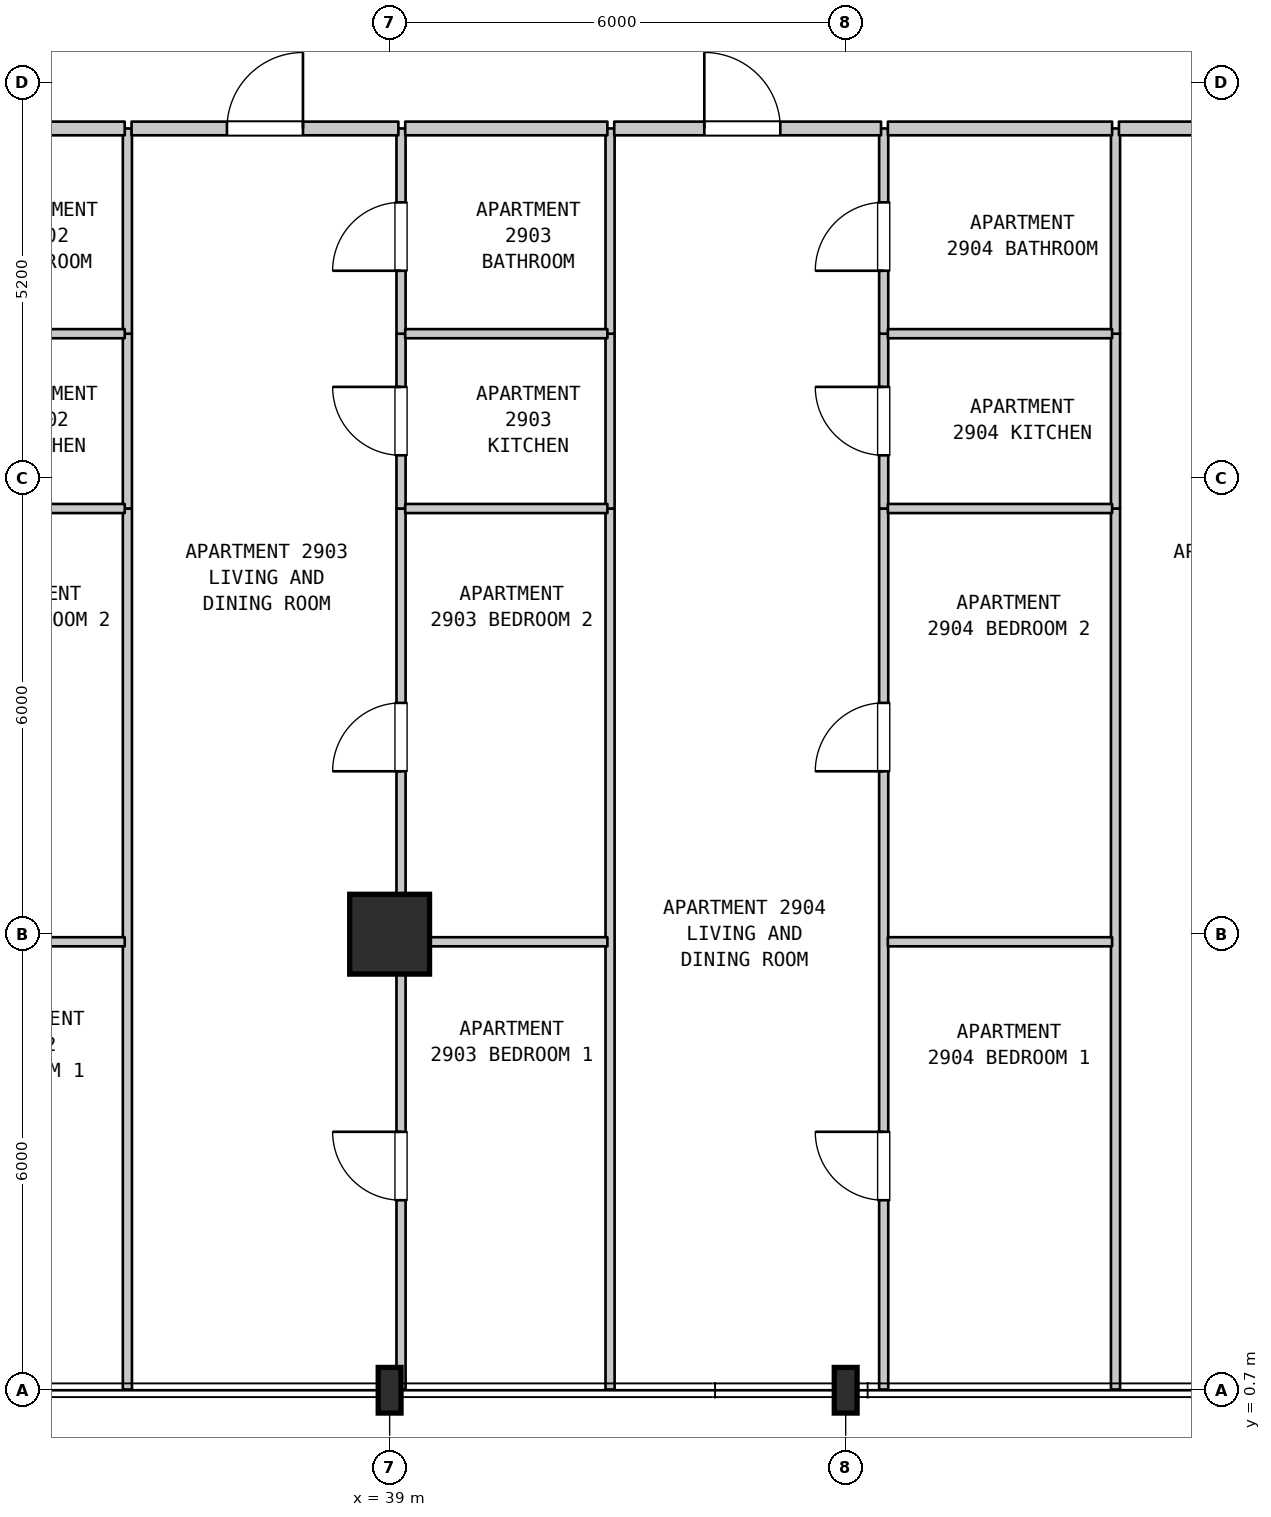
"""IFC4 building model, lengths in metres.
Left out: names, types, materials, properties, quantities, classifications, styles, units other than length and angle.
Written with IfcOpenShell. Run it as: python <this file> out.ifc"""

import sys

from ifc_helpers import new_model, si_unit, direction, frame, frame_2d, origin, origin_2d, place, context, subcontext, project, spatial, rectangle, i_section, extrude, element, fill, save


model = new_model("IFC4")
c1 = context("Model", 3, precision=1e-05, world=origin(), true_north=direction((0.0, 1.0)))
c2 = subcontext(c1, "Body", "Model", "MODEL_VIEW")
j1 = project(units=[si_unit("LENGTHUNIT", "METRE"), si_unit("PLANEANGLEUNIT", "RADIAN")], contexts=[c1])
p1 = place(None, origin())
s1 = spatial("IfcSite", under=j1, at=p1, CompositionType="ELEMENT")
p2 = place(p1, origin())
s2 = spatial("IfcBuilding", under=s1, at=p2, CompositionType="ELEMENT")
p3 = place(p2, frame((0.0, 0.0, 120.5)))
s3 = spatial("IfcBuildingStorey", under=s2, at=p3, CompositionType="ELEMENT", Elevation=120.5)
p4 = place(p3, frame((39.0, 0.7, 0.0), z_axis=(0.0, 0.0, 1.0), x_axis=(1.0, 0.0, 0.0)))
e1 = element("IfcColumn", 1, at=p4, inside=s3, PredefinedType="COLUMN", context=c2, shape_type="SweptSolid", body=[
    extrude(i_section(OverallWidth=0.3, OverallDepth=0.6, WebThickness=0.015, FlangeThickness=0.03, FilletRadius=0.027, at=origin_2d()), origin(), (0.0, 0.0, 1.0), 4.8),
])
p5 = place(p3, frame((39.0, 6.7, 0.0), z_axis=(0.0, 0.0, 1.0), x_axis=(1.0, 0.0, 0.0)))
e2 = element("IfcColumn", 2, at=p5, inside=s3, PredefinedType="COLUMN", context=c2, shape_type="SweptSolid", body=[
    extrude(rectangle(XDim=1.05, YDim=1.05, at=origin_2d()), origin(), (0.0, 0.0, 1.0), 4.8),
])
p6 = place(p3, frame((45.0, 0.7, 0.0), z_axis=(0.0, 0.0, 1.0), x_axis=(1.0, 0.0, 0.0)))
e3 = element("IfcColumn", 3, at=p6, inside=s3, PredefinedType="COLUMN", context=c2, shape_type="SweptSolid", body=[
    extrude(i_section(OverallWidth=0.3, OverallDepth=0.6, WebThickness=0.015, FlangeThickness=0.03, FilletRadius=0.027, at=origin_2d()), origin(), (0.0, 0.0, 1.0), 4.8),
])
p7 = place(p3, frame((35.55, 0.71, 0.0), z_axis=(0.0, 0.0, 1.0), x_axis=(0.0, 1.0, 0.0)))
e4 = element("IfcWall", 4, at=p7, inside=s3, PredefinedType="PARTITIONING", context=c2, shape_type="SweptSolid", body=[
    extrude(rectangle(XDim=11.59, YDim=0.12, at=frame_2d((5.795, 0.0))), origin(), (0.0, 0.0, 1.0), 4.48),
])
p8 = place(p3, frame((35.55, 12.3, 0.0), z_axis=(0.0, 0.0, 1.0), x_axis=(0.0, 1.0, 0.0)))
e5 = element("IfcWall", 5, at=p8, inside=s3, PredefinedType="PARTITIONING", context=c2, shape_type="SweptSolid", body=[
    extrude(rectangle(XDim=2.3, YDim=0.12, at=frame_2d((1.15, 0.0))), origin(), (0.0, 0.0, 1.0), 4.48),
])
p9 = place(p3, frame((35.55, 14.6, 0.0), z_axis=(0.0, 0.0, 1.0), x_axis=(0.0, 1.0, 0.0)))
e6 = element("IfcWall", 6, at=p9, inside=s3, PredefinedType="PARTITIONING", context=c2, shape_type="SweptSolid", body=[
    extrude(rectangle(XDim=2.7, YDim=0.12, at=frame_2d((1.35, 0.0))), origin(), (0.0, 0.0, 1.0), 4.48),
])
p10 = place(p3, frame((39.15, 0.71, 0.0), z_axis=(0.0, 0.0, 1.0), x_axis=(0.0, 1.0, 0.0)))
e7 = element("IfcWall", 7, at=p10, inside=s3, PredefinedType="PARTITIONING", context=c2, shape_type="SweptSolid", body=[
    extrude(rectangle(XDim=11.59, YDim=0.12, at=frame_2d((5.795, 0.0))), origin(), (0.0, 0.0, 1.0), 4.48),
])
p11 = place(p10, frame((2.49, 0.0, 0.0)))
e8 = element("IfcOpeningElement", 8, at=p11, cuts=e7, PredefinedType="OPENING", context=c2, shape_type="SweptSolid", body=[
    extrude(rectangle(XDim=0.9, YDim=2.15, at=frame_2d((0.45, 1.075))), frame((0.0, 0.07, 0.0), z_axis=(0.0, -1.0, 0.0), x_axis=(1.0, 0.0, 0.0)), (0.0, 0.0, 1.0), 0.14),
])
p12 = place(p10, frame((8.133, 0.0, 0.0)))
e9 = element("IfcOpeningElement", 9, at=p12, cuts=e7, PredefinedType="OPENING", context=c2, shape_type="SweptSolid", body=[
    extrude(rectangle(XDim=0.9, YDim=2.15, at=frame_2d((0.45, 1.075))), frame((0.0, 0.07, 0.0), z_axis=(0.0, -1.0, 0.0), x_axis=(1.0, 0.0, 0.0)), (0.0, 0.0, 1.0), 0.14),
])
p13 = place(p3, frame((39.15, 12.3, 0.0), z_axis=(0.0, 0.0, 1.0), x_axis=(0.0, 1.0, 0.0)))
e10 = element("IfcWall", 10, at=p13, inside=s3, PredefinedType="PARTITIONING", context=c2, shape_type="SweptSolid", body=[
    extrude(rectangle(XDim=2.3, YDim=0.12, at=frame_2d((1.15, 0.0))), origin(), (0.0, 0.0, 1.0), 4.48),
])
p14 = place(p13, frame((0.7, 0.0, 0.0)))
e11 = element("IfcOpeningElement", 11, at=p14, cuts=e10, PredefinedType="OPENING", context=c2, shape_type="SweptSolid", body=[
    extrude(rectangle(XDim=0.9, YDim=2.15, at=frame_2d((0.45, 1.075))), frame((0.0, 0.07, 0.0), z_axis=(0.0, -1.0, 0.0), x_axis=(1.0, 0.0, 0.0)), (0.0, 0.0, 1.0), 0.14),
])
p15 = place(p3, frame((39.15, 14.6, 0.0), z_axis=(0.0, 0.0, 1.0), x_axis=(0.0, 1.0, 0.0)))
e12 = element("IfcWall", 12, at=p15, inside=s3, PredefinedType="PARTITIONING", context=c2, shape_type="SweptSolid", body=[
    extrude(rectangle(XDim=2.7, YDim=0.12, at=frame_2d((1.35, 0.0))), origin(), (0.0, 0.0, 1.0), 4.48),
])
p16 = place(p15, frame((0.828, 0.0, 0.0)))
e13 = element("IfcOpeningElement", 13, at=p16, cuts=e12, PredefinedType="OPENING", context=c2, shape_type="SweptSolid", body=[
    extrude(rectangle(XDim=0.9, YDim=2.1, at=frame_2d((0.45, 1.05))), frame((0.0, 0.07, 0.0), z_axis=(0.0, -1.0, 0.0), x_axis=(1.0, 0.0, 0.0)), (0.0, 0.0, 1.0), 0.14),
])
p17 = place(p3, frame((41.9, 0.71, 0.0), z_axis=(0.0, 0.0, 1.0), x_axis=(0.0, 1.0, 0.0)))
e14 = element("IfcWall", 14, at=p17, inside=s3, PredefinedType="PARTITIONING", context=c2, shape_type="SweptSolid", body=[
    extrude(rectangle(XDim=11.59, YDim=0.12, at=frame_2d((5.795, 0.0))), origin(), (0.0, 0.0, 1.0), 4.48),
])
p18 = place(p3, frame((41.9, 12.3, 0.0), z_axis=(0.0, 0.0, 1.0), x_axis=(0.0, 1.0, 0.0)))
e15 = element("IfcWall", 15, at=p18, inside=s3, PredefinedType="PARTITIONING", context=c2, shape_type="SweptSolid", body=[
    extrude(rectangle(XDim=2.3, YDim=0.12, at=frame_2d((1.15, 0.0))), origin(), (0.0, 0.0, 1.0), 4.48),
])
p19 = place(p3, frame((41.9, 14.6, 0.0), z_axis=(0.0, 0.0, 1.0), x_axis=(0.0, 1.0, 0.0)))
e16 = element("IfcWall", 16, at=p19, inside=s3, PredefinedType="PARTITIONING", context=c2, shape_type="SweptSolid", body=[
    extrude(rectangle(XDim=2.7, YDim=0.12, at=frame_2d((1.35, 0.0))), origin(), (0.0, 0.0, 1.0), 4.48),
])
p20 = place(p3, frame((45.5, 0.71, 0.0), z_axis=(0.0, 0.0, 1.0), x_axis=(0.0, 1.0, 0.0)))
e17 = element("IfcWall", 17, at=p20, inside=s3, PredefinedType="PARTITIONING", context=c2, shape_type="SweptSolid", body=[
    extrude(rectangle(XDim=11.59, YDim=0.12, at=frame_2d((5.795, 0.0))), origin(), (0.0, 0.0, 1.0), 4.48),
])
p21 = place(p20, frame((2.49, 0.0, 0.0)))
e18 = element("IfcOpeningElement", 18, at=p21, cuts=e17, PredefinedType="OPENING", context=c2, shape_type="SweptSolid", body=[
    extrude(rectangle(XDim=0.9, YDim=2.15, at=frame_2d((0.45, 1.075))), frame((0.0, 0.07, 0.0), z_axis=(0.0, -1.0, 0.0), x_axis=(1.0, 0.0, 0.0)), (0.0, 0.0, 1.0), 0.14),
])
p22 = place(p20, frame((8.133, 0.0, 0.0)))
e19 = element("IfcOpeningElement", 19, at=p22, cuts=e17, PredefinedType="OPENING", context=c2, shape_type="SweptSolid", body=[
    extrude(rectangle(XDim=0.9, YDim=2.15, at=frame_2d((0.45, 1.075))), frame((0.0, 0.07, 0.0), z_axis=(0.0, -1.0, 0.0), x_axis=(1.0, 0.0, 0.0)), (0.0, 0.0, 1.0), 0.14),
])
p23 = place(p3, frame((45.5, 12.3, 0.0), z_axis=(0.0, 0.0, 1.0), x_axis=(0.0, 1.0, 0.0)))
e20 = element("IfcWall", 20, at=p23, inside=s3, PredefinedType="PARTITIONING", context=c2, shape_type="SweptSolid", body=[
    extrude(rectangle(XDim=2.3, YDim=0.12, at=frame_2d((1.15, 0.0))), origin(), (0.0, 0.0, 1.0), 4.48),
])
p24 = place(p23, frame((0.7, 0.0, 0.0)))
e21 = element("IfcOpeningElement", 21, at=p24, cuts=e20, PredefinedType="OPENING", context=c2, shape_type="SweptSolid", body=[
    extrude(rectangle(XDim=0.9, YDim=2.15, at=frame_2d((0.45, 1.075))), frame((0.0, 0.07, 0.0), z_axis=(0.0, -1.0, 0.0), x_axis=(1.0, 0.0, 0.0)), (0.0, 0.0, 1.0), 0.14),
])
p25 = place(p3, frame((45.5, 14.6, 0.0), z_axis=(0.0, 0.0, 1.0), x_axis=(0.0, 1.0, 0.0)))
e22 = element("IfcWall", 22, at=p25, inside=s3, PredefinedType="PARTITIONING", context=c2, shape_type="SweptSolid", body=[
    extrude(rectangle(XDim=2.7, YDim=0.12, at=frame_2d((1.35, 0.0))), origin(), (0.0, 0.0, 1.0), 4.48),
])
p26 = place(p25, frame((0.828, 0.0, 0.0)))
e23 = element("IfcOpeningElement", 23, at=p26, cuts=e22, PredefinedType="OPENING", context=c2, shape_type="SweptSolid", body=[
    extrude(rectangle(XDim=0.9, YDim=2.1, at=frame_2d((0.45, 1.05))), frame((0.0, 0.07, 0.0), z_axis=(0.0, -1.0, 0.0), x_axis=(1.0, 0.0, 0.0)), (0.0, 0.0, 1.0), 0.14),
])
p27 = place(p3, frame((48.55, 0.71, 0.0), z_axis=(0.0, 0.0, 1.0), x_axis=(0.0, 1.0, 0.0)))
e24 = element("IfcWall", 24, at=p27, inside=s3, PredefinedType="PARTITIONING", context=c2, shape_type="SweptSolid", body=[
    extrude(rectangle(XDim=11.59, YDim=0.12, at=frame_2d((5.795, 0.0))), origin(), (0.0, 0.0, 1.0), 4.48),
])
p28 = place(p3, frame((48.55, 12.3, 0.0), z_axis=(0.0, 0.0, 1.0), x_axis=(0.0, 1.0, 0.0)))
e25 = element("IfcWall", 25, at=p28, inside=s3, PredefinedType="PARTITIONING", context=c2, shape_type="SweptSolid", body=[
    extrude(rectangle(XDim=2.3, YDim=0.12, at=frame_2d((1.15, 0.0))), origin(), (0.0, 0.0, 1.0), 4.48),
])
p29 = place(p3, frame((48.55, 14.6, 0.0), z_axis=(0.0, 0.0, 1.0), x_axis=(0.0, 1.0, 0.0)))
e26 = element("IfcWall", 26, at=p29, inside=s3, PredefinedType="PARTITIONING", context=c2, shape_type="SweptSolid", body=[
    extrude(rectangle(XDim=2.7, YDim=0.12, at=frame_2d((1.35, 0.0))), origin(), (0.0, 0.0, 1.0), 4.48),
])
p30 = place(p3, frame((32.845, 6.6, 0.0), z_axis=(0.0, 0.0, 1.0), x_axis=(1.0, 0.0, 0.0)))
e27 = element("IfcWall", 27, at=p30, inside=s3, PredefinedType="PARTITIONING", context=c2, shape_type="SweptSolid", body=[
    extrude(rectangle(XDim=2.67, YDim=0.12, at=frame_2d((1.335, 0.0))), origin(), (0.0, 0.0, 1.0), 4.03),
])
p31 = place(p3, frame((39.205, 6.6, 0.0), z_axis=(0.0, 0.0, 1.0), x_axis=(1.0, 0.0, 0.0)))
e28 = element("IfcWall", 28, at=p31, inside=s3, PredefinedType="PARTITIONING", context=c2, shape_type="SweptSolid", body=[
    extrude(rectangle(XDim=2.66, YDim=0.12, at=frame_2d((1.33, 0.0))), origin(), (0.0, 0.0, 1.0), 3.88),
])
p32 = place(p3, frame((45.555, 6.6, 0.0), z_axis=(0.0, 0.0, 1.0), x_axis=(1.0, 0.0, 0.0)))
e29 = element("IfcWall", 29, at=p32, inside=s3, PredefinedType="PARTITIONING", context=c2, shape_type="SweptSolid", body=[
    extrude(rectangle(XDim=2.95, YDim=0.12, at=frame_2d((1.475, 0.0))), origin(), (0.0, 0.0, 1.0), 3.88),
])
p33 = place(p3, frame((32.845, 12.3, 0.0), z_axis=(0.0, 0.0, 1.0), x_axis=(1.0, 0.0, 0.0)))
e30 = element("IfcWall", 30, at=p33, inside=s3, PredefinedType="PARTITIONING", context=c2, shape_type="SweptSolid", body=[
    extrude(rectangle(XDim=2.67, YDim=0.12, at=frame_2d((1.335, 0.0))), origin(), (0.0, 0.0, 1.0), 4.48),
])
p34 = place(p3, frame((39.205, 12.3, 0.0), z_axis=(0.0, 0.0, 1.0), x_axis=(1.0, 0.0, 0.0)))
e31 = element("IfcWall", 31, at=p34, inside=s3, PredefinedType="PARTITIONING", context=c2, shape_type="SweptSolid", body=[
    extrude(rectangle(XDim=2.66, YDim=0.12, at=frame_2d((1.33, 0.0))), origin(), (0.0, 0.0, 1.0), 4.48),
])
p35 = place(p3, frame((45.555, 12.3, 0.0), z_axis=(0.0, 0.0, 1.0), x_axis=(1.0, 0.0, 0.0)))
e32 = element("IfcWall", 32, at=p35, inside=s3, PredefinedType="PARTITIONING", context=c2, shape_type="SweptSolid", body=[
    extrude(rectangle(XDim=2.95, YDim=0.12, at=frame_2d((1.475, 0.0))), origin(), (0.0, 0.0, 1.0), 4.48),
])
p36 = place(p3, frame((32.845, 14.6, 0.0), z_axis=(0.0, 0.0, 1.0), x_axis=(1.0, 0.0, 0.0)))
e33 = element("IfcWall", 33, at=p36, inside=s3, PredefinedType="PARTITIONING", context=c2, shape_type="SweptSolid", body=[
    extrude(rectangle(XDim=2.67, YDim=0.12, at=frame_2d((1.335, 0.0))), origin(), (0.0, 0.0, 1.0), 4.48),
])
p37 = place(p3, frame((39.205, 14.6, 0.0), z_axis=(0.0, 0.0, 1.0), x_axis=(1.0, 0.0, 0.0)))
e34 = element("IfcWall", 34, at=p37, inside=s3, PredefinedType="PARTITIONING", context=c2, shape_type="SweptSolid", body=[
    extrude(rectangle(XDim=2.66, YDim=0.12, at=frame_2d((1.33, 0.0))), origin(), (0.0, 0.0, 1.0), 4.48),
])
p38 = place(p3, frame((45.555, 14.6, 0.0), z_axis=(0.0, 0.0, 1.0), x_axis=(1.0, 0.0, 0.0)))
e35 = element("IfcWall", 35, at=p38, inside=s3, PredefinedType="PARTITIONING", context=c2, shape_type="SweptSolid", body=[
    extrude(rectangle(XDim=2.95, YDim=0.12, at=frame_2d((1.475, 0.0))), origin(), (0.0, 0.0, 1.0), 4.48),
])
p39 = place(p3, frame((32.845, 17.3, 0.0), z_axis=(0.0, 0.0, 1.0), x_axis=(1.0, 0.0, 0.0)))
e36 = element("IfcWall", 36, at=p39, inside=s3, PredefinedType="STANDARD", context=c2, shape_type="SweptSolid", body=[
    extrude(rectangle(XDim=2.67, YDim=0.18, at=frame_2d((1.335, 0.0))), origin(), (0.0, 0.0, 1.0), 4.48),
])
p40 = place(p3, frame((35.605, 17.3, 0.0), z_axis=(0.0, 0.0, 1.0), x_axis=(1.0, 0.0, 0.0)))
e37 = element("IfcWall", 37, at=p40, inside=s3, PredefinedType="STANDARD", context=c2, shape_type="SweptSolid", body=[
    extrude(rectangle(XDim=3.51, YDim=0.18, at=frame_2d((1.755, 0.0))), origin(), (0.0, 0.0, 1.0), 4.48),
])
p41 = place(p40, frame((1.255, 0.0, 0.0)))
e38 = element("IfcOpeningElement", 38, at=p41, cuts=e37, PredefinedType="OPENING", context=c2, shape_type="SweptSolid", body=[
    extrude(rectangle(XDim=1.0, YDim=2.15, at=frame_2d((0.5, 1.075))), frame((0.0, 0.1, 0.0), z_axis=(0.0, -1.0, 0.0), x_axis=(1.0, 0.0, 0.0)), (0.0, 0.0, 1.0), 0.2),
])
p42 = place(p3, frame((39.205, 17.3, 0.0), z_axis=(0.0, 0.0, 1.0), x_axis=(1.0, 0.0, 0.0)))
e39 = element("IfcWall", 39, at=p42, inside=s3, PredefinedType="STANDARD", context=c2, shape_type="SweptSolid", body=[
    extrude(rectangle(XDim=2.66, YDim=0.18, at=frame_2d((1.33, 0.0))), origin(), (0.0, 0.0, 1.0), 4.48),
])
p43 = place(p3, frame((41.955, 17.3, 0.0), z_axis=(0.0, 0.0, 1.0), x_axis=(1.0, 0.0, 0.0)))
e40 = element("IfcWall", 40, at=p43, inside=s3, PredefinedType="STANDARD", context=c2, shape_type="SweptSolid", body=[
    extrude(rectangle(XDim=3.51, YDim=0.18, at=frame_2d((1.755, 0.0))), origin(), (0.0, 0.0, 1.0), 4.48),
])
p44 = place(p43, frame((1.185, 0.0, 0.0)))
e41 = element("IfcOpeningElement", 41, at=p44, cuts=e40, PredefinedType="OPENING", context=c2, shape_type="SweptSolid", body=[
    extrude(rectangle(XDim=1.0, YDim=2.15, at=frame_2d((0.5, 1.075))), frame((0.0, 0.1, 0.0), z_axis=(0.0, -1.0, 0.0), x_axis=(1.0, 0.0, 0.0)), (0.0, 0.0, 1.0), 0.2),
])
p45 = place(p3, frame((45.555, 17.3, 0.0), z_axis=(0.0, 0.0, 1.0), x_axis=(1.0, 0.0, 0.0)))
e42 = element("IfcWall", 42, at=p45, inside=s3, PredefinedType="STANDARD", context=c2, shape_type="SweptSolid", body=[
    extrude(rectangle(XDim=2.95, YDim=0.18, at=frame_2d((1.475, 0.0))), origin(), (0.0, 0.0, 1.0), 4.48),
])
p46 = place(p3, frame((48.595, 17.3, 0.0), z_axis=(0.0, 0.0, 1.0), x_axis=(1.0, 0.0, 0.0)))
e43 = element("IfcWall", 43, at=p46, inside=s3, PredefinedType="STANDARD", context=c2, shape_type="SweptSolid", body=[
    extrude(rectangle(XDim=3.51, YDim=0.18, at=frame_2d((1.755, 0.0))), origin(), (0.0, 0.0, 1.0), 4.48),
])
p47 = place(p46, frame((1.185, 0.0, 0.0)))
e44 = element("IfcOpeningElement", 44, at=p47, cuts=e43, PredefinedType="OPENING", context=c2, shape_type="SweptSolid", body=[
    extrude(rectangle(XDim=1.0, YDim=2.15, at=frame_2d((0.5, 1.075))), frame((0.0, 0.1, 0.0), z_axis=(0.0, -1.0, 0.0), x_axis=(1.0, 0.0, 0.0)), (0.0, 0.0, 1.0), 0.2),
])
p48 = place(p11, origin())
e45 = element("IfcDoor", 45, at=p48, inside=s3, OperationType="SINGLE_SWING_RIGHT", PredefinedType="DOOR", context=c2, shape_type="SweptSolid", body=[
    extrude(rectangle(XDim=0.9, YDim=2.15, at=frame_2d((0.45, 1.075))), frame((0.0, 0.025, 0.0), z_axis=(0.0, -1.0, 0.0), x_axis=(1.0, 0.0, 0.0)), (0.0, 0.0, 1.0), 0.05),
])
fill(e8, e45)
p49 = place(p12, origin())
e46 = element("IfcDoor", 46, at=p49, inside=s3, OperationType="SINGLE_SWING_LEFT", PredefinedType="DOOR", context=c2, shape_type="SweptSolid", body=[
    extrude(rectangle(XDim=0.9, YDim=2.15, at=frame_2d((0.45, 1.075))), frame((0.0, 0.025, 0.0), z_axis=(0.0, -1.0, 0.0), x_axis=(1.0, 0.0, 0.0)), (0.0, 0.0, 1.0), 0.05),
])
fill(e9, e46)
p50 = place(p14, origin())
e47 = element("IfcDoor", 47, at=p50, inside=s3, OperationType="SINGLE_SWING_RIGHT", PredefinedType="DOOR", context=c2, shape_type="SweptSolid", body=[
    extrude(rectangle(XDim=0.9, YDim=2.15, at=frame_2d((0.45, 1.075))), frame((0.0, 0.025, 0.0), z_axis=(0.0, -1.0, 0.0), x_axis=(1.0, 0.0, 0.0)), (0.0, 0.0, 1.0), 0.05),
])
fill(e11, e47)
p51 = place(p16, origin())
e48 = element("IfcDoor", 48, at=p51, inside=s3, OperationType="SINGLE_SWING_LEFT", PredefinedType="DOOR", context=c2, shape_type="SweptSolid", body=[
    extrude(rectangle(XDim=0.9, YDim=2.1, at=frame_2d((0.45, 1.05))), frame((0.0, 0.025, 0.0), z_axis=(0.0, -1.0, 0.0), x_axis=(1.0, 0.0, 0.0)), (0.0, 0.0, 1.0), 0.05),
])
fill(e13, e48)
p52 = place(p21, origin())
e49 = element("IfcDoor", 49, at=p52, inside=s3, OperationType="SINGLE_SWING_RIGHT", PredefinedType="DOOR", context=c2, shape_type="SweptSolid", body=[
    extrude(rectangle(XDim=0.9, YDim=2.15, at=frame_2d((0.45, 1.075))), frame((0.0, 0.025, 0.0), z_axis=(0.0, -1.0, 0.0), x_axis=(1.0, 0.0, 0.0)), (0.0, 0.0, 1.0), 0.05),
])
fill(e18, e49)
p53 = place(p22, origin())
e50 = element("IfcDoor", 50, at=p53, inside=s3, OperationType="SINGLE_SWING_LEFT", PredefinedType="DOOR", context=c2, shape_type="SweptSolid", body=[
    extrude(rectangle(XDim=0.9, YDim=2.15, at=frame_2d((0.45, 1.075))), frame((0.0, 0.025, 0.0), z_axis=(0.0, -1.0, 0.0), x_axis=(1.0, 0.0, 0.0)), (0.0, 0.0, 1.0), 0.05),
])
fill(e19, e50)
p54 = place(p24, origin())
e51 = element("IfcDoor", 51, at=p54, inside=s3, OperationType="SINGLE_SWING_RIGHT", PredefinedType="DOOR", context=c2, shape_type="SweptSolid", body=[
    extrude(rectangle(XDim=0.9, YDim=2.15, at=frame_2d((0.45, 1.075))), frame((0.0, 0.025, 0.0), z_axis=(0.0, -1.0, 0.0), x_axis=(1.0, 0.0, 0.0)), (0.0, 0.0, 1.0), 0.05),
])
fill(e21, e51)
p55 = place(p26, origin())
e52 = element("IfcDoor", 52, at=p55, inside=s3, OperationType="SINGLE_SWING_LEFT", PredefinedType="DOOR", context=c2, shape_type="SweptSolid", body=[
    extrude(rectangle(XDim=0.9, YDim=2.1, at=frame_2d((0.45, 1.05))), frame((0.0, 0.025, 0.0), z_axis=(0.0, -1.0, 0.0), x_axis=(1.0, 0.0, 0.0)), (0.0, 0.0, 1.0), 0.05),
])
fill(e23, e52)
p56 = place(p41, origin())
e53 = element("IfcDoor", 53, at=p56, inside=s3, OperationType="SINGLE_SWING_RIGHT", PredefinedType="DOOR", context=c2, shape_type="SweptSolid", body=[
    extrude(rectangle(XDim=1.0, YDim=2.15, at=frame_2d((0.5, 1.075))), frame((0.0, 0.025, 0.0), z_axis=(0.0, -1.0, 0.0), x_axis=(1.0, 0.0, 0.0)), (0.0, 0.0, 1.0), 0.05),
])
fill(e38, e53)
p57 = place(p44, origin())
e54 = element("IfcDoor", 54, at=p57, inside=s3, OperationType="SINGLE_SWING_LEFT", PredefinedType="DOOR", context=c2, shape_type="SweptSolid", body=[
    extrude(rectangle(XDim=1.0, YDim=2.15, at=frame_2d((0.5, 1.075))), frame((0.0, 0.025, 0.0), z_axis=(0.0, -1.0, 0.0), x_axis=(1.0, 0.0, 0.0)), (0.0, 0.0, 1.0), 0.05),
])
fill(e41, e54)
save(model, sys.argv[1])
